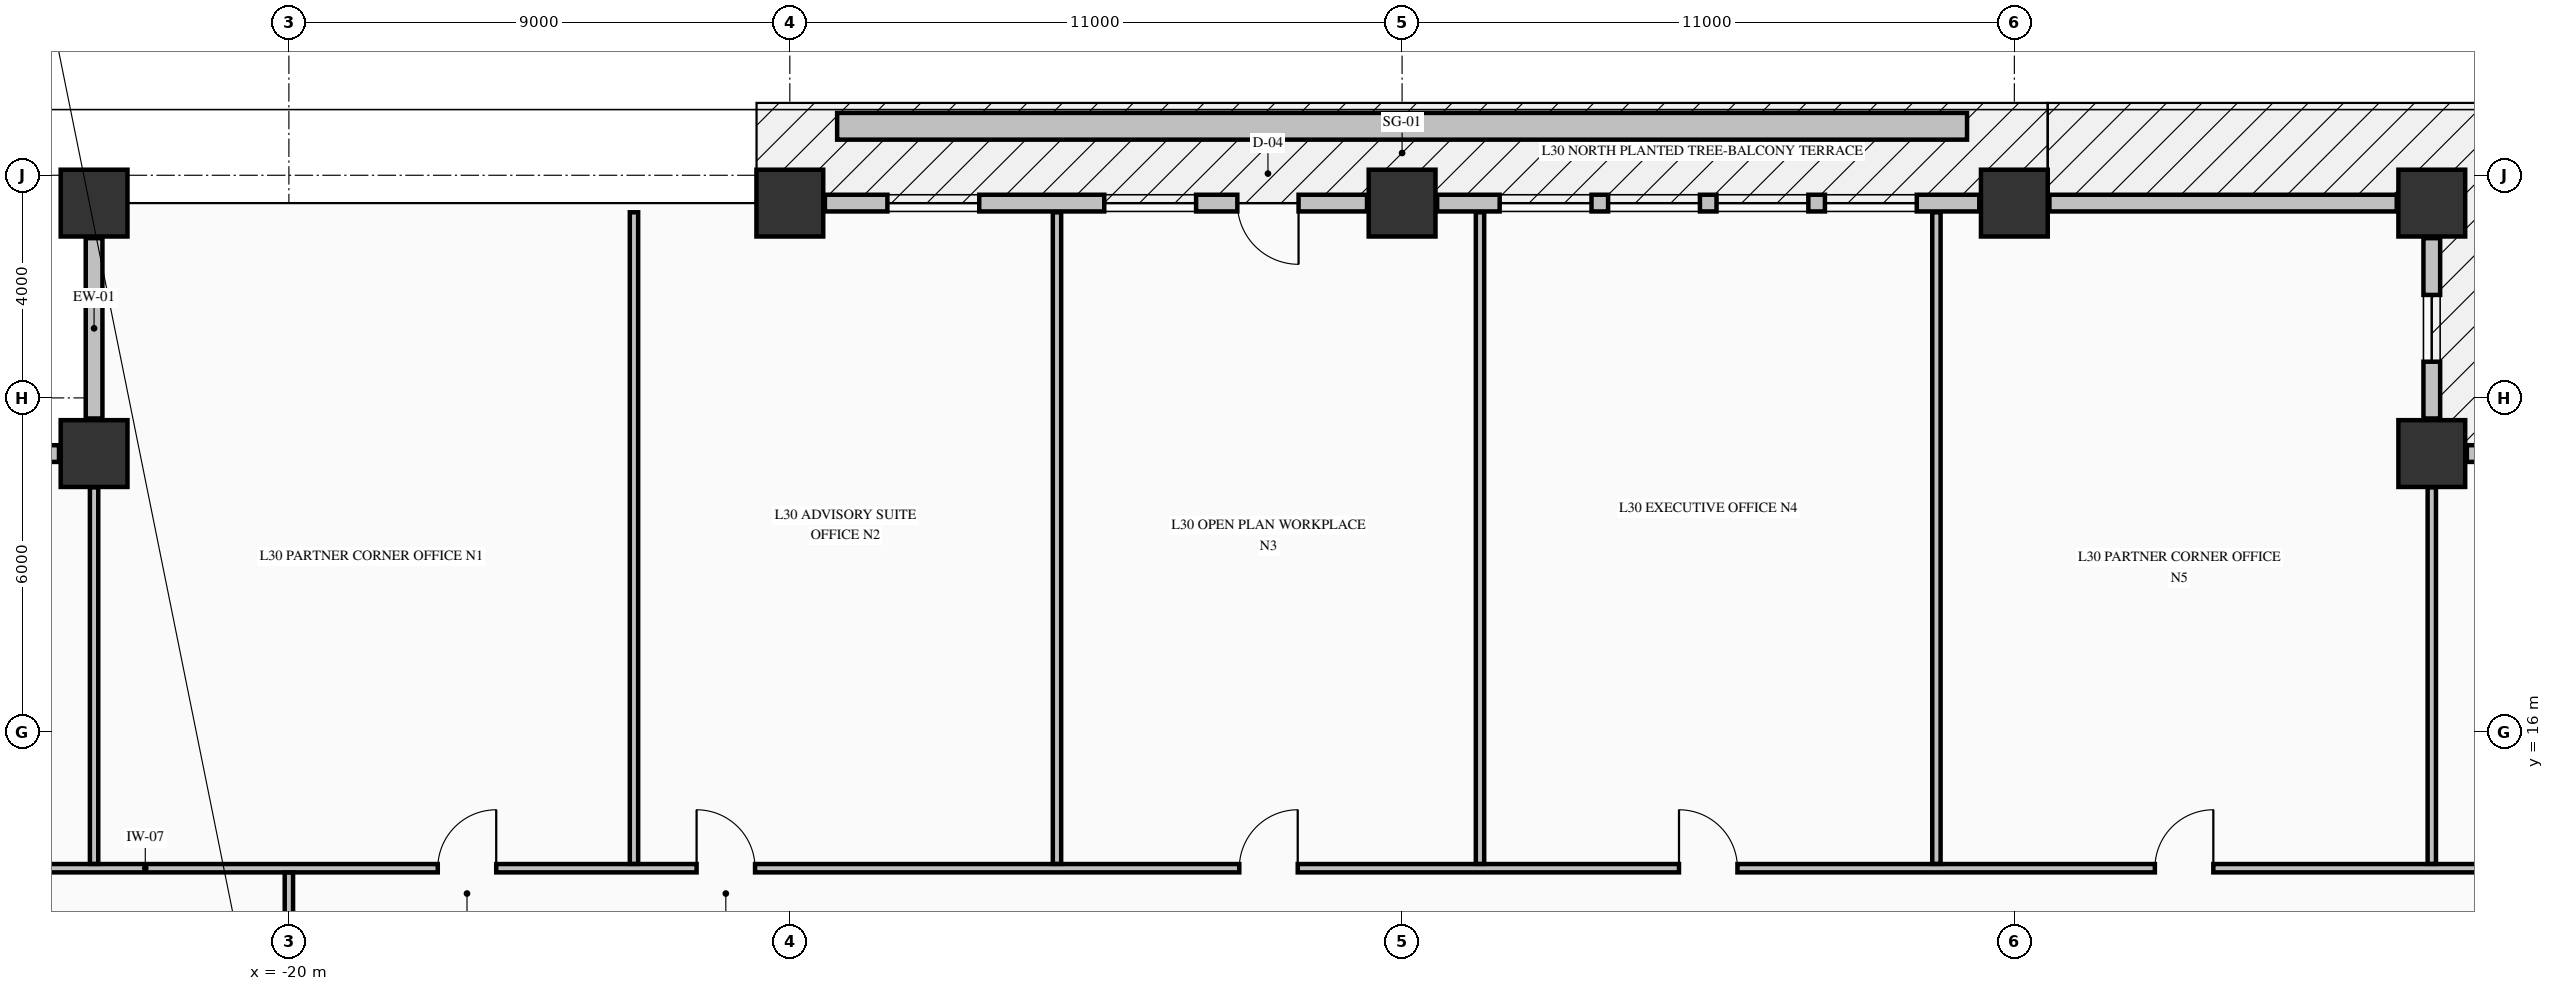
"""IFC4 building model, lengths in metres.
Left out: names, types, materials, properties, quantities, classifications, styles, units other than length and angle.
Written with IfcOpenShell. Run it as: python <this file> out.ifc"""

import sys

from ifc_helpers import new_model, si_unit, direction, frame, frame_2d, origin, origin_2d, place, context, subcontext, project, spatial, rectangle, extrude, element, fill, save


model = new_model("IFC4")
c1 = context("Model", 3, precision=1e-05, world=origin(), true_north=direction((0.0, 1.0)))
c2 = subcontext(c1, "Body", "Model", "MODEL_VIEW")
j1 = project(units=[si_unit("LENGTHUNIT", "METRE"), si_unit("PLANEANGLEUNIT", "RADIAN")], contexts=[c1])
p1 = place(None, origin())
s1 = spatial("IfcSite", under=j1, at=p1, CompositionType="ELEMENT")
p2 = place(p1, origin())
s2 = spatial("IfcBuilding", under=s1, at=p2, CompositionType="ELEMENT")
p3 = place(p2, frame((0.0, 0.0, 121.35)))
s3 = spatial("IfcBuildingStorey", under=s2, at=p3, CompositionType="ELEMENT", Elevation=121.35)
for number, where, z_axis, x_axis in (
    (1, (-23.5, 25.5, -0.425), (0.0, 0.0, 1.0), (1.0, 0.0, 0.0)),
    (2, (-11.0, 25.5, -0.425), (0.0, 0.0, 1.0), (1.0, 0.0, 0.0)),
    (3, (0.0, 25.5, -0.425), (0.0, 0.0, 1.0), (1.0, 0.0, 0.0)),
    (4, (11.0, 25.5, -0.425), (0.0, 0.0, 1.0), (1.0, 0.0, 0.0)),
    (5, (18.5, 25.5, -0.425), (0.0, 0.0, 1.0), (1.0, 0.0, 0.0)),
    (6, (18.5, 21.0, -0.425), (0.0, 0.0, 1.0), (1.0, 0.0, 0.0)),
    (7, (-23.5, 21.0, -0.425), (0.0, 0.0, 1.0), (1.0, 0.0, 0.0)),
):
    element("IfcColumn", number, at=place(p3, frame(where, z_axis=z_axis, x_axis=x_axis)), inside=s3, PredefinedType="COLUMN", context=c2, shape_type="SweptSolid", body=[
        extrude(rectangle(XDim=1.2, YDim=1.2, at=origin_2d()), origin(), (0.0, 0.0, 1.0), 3.745),
    ])
p4 = place(p3, frame((22.37, 21.0, 0.0), z_axis=(0.0, 0.0, 1.0), x_axis=(-1.0, 0.0, 0.0)))
e8 = element("IfcWall", 8, at=p4, inside=s3, PredefinedType="STANDARD", context=c2, shape_type="SweptSolid", body=[
    extrude(rectangle(XDim=3.24, YDim=0.3, at=frame_2d((1.62, 0.0))), origin(), (0.0, 0.0, 1.0), 2.712),
])
p5 = place(p4, frame((1.02, 0.0, 0.82)))
e9 = element("IfcOpeningElement", 9, at=p5, cuts=e8, PredefinedType="OPENING", context=c2, shape_type="SweptSolid", body=[
    extrude(rectangle(XDim=1.2, YDim=1.65, at=frame_2d((0.6, 0.825))), frame((0.0, 0.16, 0.0), z_axis=(0.0, -1.0, 0.0), x_axis=(1.0, 0.0, 0.0)), (0.0, 0.0, 1.0), 0.32),
])
p6 = place(p3, frame((18.5, 21.63, 0.0), z_axis=(0.0, 0.0, 1.0), x_axis=(0.0, 1.0, 0.0)))
e10 = element("IfcWall", 10, at=p6, inside=s3, PredefinedType="STANDARD", context=c2, shape_type="SweptSolid", body=[
    extrude(rectangle(XDim=3.24, YDim=0.3, at=frame_2d((1.62, 0.0))), origin(), (0.0, 0.0, 1.0), 2.712),
])
p7 = place(p6, frame((1.02, 0.0, 0.82)))
e11 = element("IfcOpeningElement", 11, at=p7, cuts=e10, PredefinedType="OPENING", context=c2, shape_type="SweptSolid", body=[
    extrude(rectangle(XDim=1.2, YDim=1.65, at=frame_2d((0.6, 0.825))), frame((0.0, 0.16, 0.0), z_axis=(0.0, -1.0, 0.0), x_axis=(1.0, 0.0, 0.0)), (0.0, 0.0, 1.0), 0.32),
])
for number, where, z_axis, x_axis in (
    (12, (-23.5, 24.87, 0.0), (0.0, 0.0, 1.0), (0.0, -1.0, 0.0)),
    (13, (-24.13, 21.0, 0.0), (0.0, 0.0, 1.0), (-1.0, 0.0, 0.0)),
):
    element("IfcWall", number, at=place(p3, frame(where, z_axis=z_axis, x_axis=x_axis)), inside=s3, PredefinedType="STANDARD", context=c2, shape_type="SweptSolid", body=[
        extrude(rectangle(XDim=3.24, YDim=0.3, at=frame_2d((1.62, 0.0))), origin(), (0.0, 0.0, 1.0), 1.512),
    ])
p8 = place(p3, frame((-0.63, 25.5, 0.0), z_axis=(0.0, 0.0, 1.0), x_axis=(-1.0, 0.0, 0.0)))
e14 = element("IfcWall", 14, at=p8, inside=s3, PredefinedType="STANDARD", context=c2, shape_type="SweptSolid", body=[
    extrude(rectangle(XDim=9.74, YDim=0.3, at=frame_2d((4.87, 0.0))), origin(), (0.0, 0.0, 1.0), 2.712),
])
p9 = place(p8, frame((1.23, 0.0, 0.0)))
e15 = element("IfcOpeningElement", 15, at=p9, cuts=e14, PredefinedType="OPENING", context=c2, shape_type="SweptSolid", body=[
    extrude(rectangle(XDim=1.1, YDim=2.15, at=frame_2d((0.55, 1.075))), frame((0.0, 0.16, 0.0), z_axis=(0.0, -1.0, 0.0), x_axis=(1.0, 0.0, 0.0)), (0.0, 0.0, 1.0), 0.32),
])
p10 = place(p8, frame((3.071, 0.0, 0.8)))
e16 = element("IfcOpeningElement", 16, at=p10, cuts=e14, PredefinedType="OPENING", context=c2, shape_type="SweptSolid", body=[
    extrude(rectangle(XDim=1.65, YDim=1.7, at=frame_2d((0.825, 0.85))), frame((0.0, 0.16, 0.0), z_axis=(0.0, -1.0, 0.0), x_axis=(1.0, 0.0, 0.0)), (0.0, 0.0, 1.0), 0.32),
])
p11 = place(p8, frame((6.967, 0.0, 0.8)))
e17 = element("IfcOpeningElement", 17, at=p11, cuts=e14, PredefinedType="OPENING", context=c2, shape_type="SweptSolid", body=[
    extrude(rectangle(XDim=1.65, YDim=1.7, at=frame_2d((0.825, 0.85))), frame((0.0, 0.16, 0.0), z_axis=(0.0, -1.0, 0.0), x_axis=(1.0, 0.0, 0.0)), (0.0, 0.0, 1.0), 0.32),
])
p12 = place(p3, frame((10.37, 25.5, 0.0), z_axis=(0.0, 0.0, 1.0), x_axis=(-1.0, 0.0, 0.0)))
e18 = element("IfcWall", 18, at=p12, inside=s3, PredefinedType="STANDARD", context=c2, shape_type="SweptSolid", body=[
    extrude(rectangle(XDim=9.74, YDim=0.3, at=frame_2d((4.87, 0.0))), origin(), (0.0, 0.0, 1.0), 2.712),
])
p13 = place(p12, frame((1.123, 0.0, 0.8)))
e19 = element("IfcOpeningElement", 19, at=p13, cuts=e18, PredefinedType="OPENING", context=c2, shape_type="SweptSolid", body=[
    extrude(rectangle(XDim=1.65, YDim=1.7, at=frame_2d((0.825, 0.85))), frame((0.0, 0.16, 0.0), z_axis=(0.0, -1.0, 0.0), x_axis=(1.0, 0.0, 0.0)), (0.0, 0.0, 1.0), 0.32),
])
p14 = place(p12, frame((3.071, 0.0, 0.8)))
e20 = element("IfcOpeningElement", 20, at=p14, cuts=e18, PredefinedType="OPENING", context=c2, shape_type="SweptSolid", body=[
    extrude(rectangle(XDim=1.65, YDim=1.7, at=frame_2d((0.825, 0.85))), frame((0.0, 0.16, 0.0), z_axis=(0.0, -1.0, 0.0), x_axis=(1.0, 0.0, 0.0)), (0.0, 0.0, 1.0), 0.32),
])
p15 = place(p12, frame((5.019, 0.0, 0.8)))
e21 = element("IfcOpeningElement", 21, at=p15, cuts=e18, PredefinedType="OPENING", context=c2, shape_type="SweptSolid", body=[
    extrude(rectangle(XDim=1.65, YDim=1.7, at=frame_2d((0.825, 0.85))), frame((0.0, 0.16, 0.0), z_axis=(0.0, -1.0, 0.0), x_axis=(1.0, 0.0, 0.0)), (0.0, 0.0, 1.0), 0.32),
])
p16 = place(p12, frame((6.967, 0.0, 0.8)))
e22 = element("IfcOpeningElement", 22, at=p16, cuts=e18, PredefinedType="OPENING", context=c2, shape_type="SweptSolid", body=[
    extrude(rectangle(XDim=1.65, YDim=1.7, at=frame_2d((0.825, 0.85))), frame((0.0, 0.16, 0.0), z_axis=(0.0, -1.0, 0.0), x_axis=(1.0, 0.0, 0.0)), (0.0, 0.0, 1.0), 0.32),
])
p17 = place(p3, frame((17.87, 25.5, 0.0), z_axis=(0.0, 0.0, 1.0), x_axis=(-1.0, 0.0, 0.0)))
e23 = element("IfcWall", 23, at=p17, inside=s3, PredefinedType="STANDARD", context=c2, shape_type="SweptSolid", body=[
    extrude(rectangle(XDim=6.24, YDim=0.3, at=frame_2d((3.12, 0.0))), origin(), (0.0, 0.0, 1.0), 2.712),
])
p18 = place(p3, frame((-27.835, 13.55, 0.0), z_axis=(0.0, 0.0, 1.0), x_axis=(1.0, 0.0, 0.0)))
e24 = element("IfcWall", 24, at=p18, inside=s3, PredefinedType="PARTITIONING", context=c2, shape_type="SweptSolid", body=[
    extrude(rectangle(XDim=50.67, YDim=0.15, at=frame_2d((25.335, 0.0))), origin(), (0.0, 0.0, 1.0), 3.32),
])
p19 = place(p18, frame((10.51, 0.0, 0.0)))
e25 = element("IfcOpeningElement", 25, at=p19, cuts=e24, PredefinedType="OPENING", context=c2, shape_type="SweptSolid", body=[
    extrude(rectangle(XDim=1.05, YDim=2.15, at=frame_2d((0.525, 1.075))), frame((0.0, 0.085, 0.0), z_axis=(0.0, -1.0, 0.0), x_axis=(1.0, 0.0, 0.0)), (0.0, 0.0, 1.0), 0.17),
])
p20 = place(p18, frame((15.16, 0.0, 0.0)))
e26 = element("IfcOpeningElement", 26, at=p20, cuts=e24, PredefinedType="OPENING", context=c2, shape_type="SweptSolid", body=[
    extrude(rectangle(XDim=1.05, YDim=2.15, at=frame_2d((0.525, 1.075))), frame((0.0, 0.085, 0.0), z_axis=(0.0, -1.0, 0.0), x_axis=(1.0, 0.0, 0.0)), (0.0, 0.0, 1.0), 0.17),
])
p21 = place(p18, frame((24.91, 0.0, 0.0)))
e27 = element("IfcOpeningElement", 27, at=p21, cuts=e24, PredefinedType="OPENING", context=c2, shape_type="SweptSolid", body=[
    extrude(rectangle(XDim=1.05, YDim=2.15, at=frame_2d((0.525, 1.075))), frame((0.0, 0.085, 0.0), z_axis=(0.0, -1.0, 0.0), x_axis=(1.0, 0.0, 0.0)), (0.0, 0.0, 1.0), 0.17),
])
p22 = place(p18, frame((32.81, 0.0, 0.0)))
e28 = element("IfcOpeningElement", 28, at=p22, cuts=e24, PredefinedType="OPENING", context=c2, shape_type="SweptSolid", body=[
    extrude(rectangle(XDim=1.05, YDim=2.15, at=frame_2d((0.525, 1.075))), frame((0.0, 0.085, 0.0), z_axis=(0.0, -1.0, 0.0), x_axis=(1.0, 0.0, 0.0)), (0.0, 0.0, 1.0), 0.17),
])
p23 = place(p18, frame((41.36, 0.0, 0.0)))
e29 = element("IfcOpeningElement", 29, at=p23, cuts=e24, PredefinedType="OPENING", context=c2, shape_type="SweptSolid", body=[
    extrude(rectangle(XDim=1.05, YDim=2.15, at=frame_2d((0.525, 1.075))), frame((0.0, 0.085, 0.0), z_axis=(0.0, -1.0, 0.0), x_axis=(1.0, 0.0, 0.0)), (0.0, 0.0, 1.0), 0.17),
])
p24 = place(p3, frame((-23.5, 13.628, 0.0), z_axis=(0.0, 0.0, 1.0), x_axis=(0.0, 1.0, 0.0)))
e30 = element("IfcWall", 30, at=p24, inside=s3, PredefinedType="PARTITIONING", context=c2, shape_type="SweptSolid", body=[
    extrude(rectangle(XDim=6.766, YDim=0.15, at=frame_2d((3.383, 0.0))), origin(), (0.0, 0.0, 1.0), 3.32),
])
p25 = place(p3, frame((-20.0, 11.006, 0.0), z_axis=(0.0, 0.0, 1.0), x_axis=(0.0, 1.0, 0.0)))
e31 = element("IfcWall", 31, at=p25, inside=s3, PredefinedType="PARTITIONING", context=c2, shape_type="SweptSolid", body=[
    extrude(rectangle(XDim=2.466, YDim=0.15, at=frame_2d((1.233, 0.0))), origin(), (0.0, 0.0, 1.0), 2.81),
])
p26 = place(p25, frame((0.549, 0.0, 0.0)))
e32 = element("IfcOpeningElement", 32, at=p26, cuts=e31, PredefinedType="OPENING", context=c2, shape_type="SweptSolid", body=[
    extrude(rectangle(XDim=0.95, YDim=2.15, at=frame_2d((0.475, 1.075))), frame((0.0, 0.085, 0.0), z_axis=(0.0, -1.0, 0.0), x_axis=(1.0, 0.0, 0.0)), (0.0, 0.0, 1.0), 0.17),
])
for number, where, z_axis, x_axis in (
    (33, (-13.8, 13.628, 0.0), (0.0, 0.0, 1.0), (0.0, 1.0, 0.0)),
    (34, (-6.2, 13.628, 0.0), (0.0, 0.0, 1.0), (0.0, 1.0, 0.0)),
    (35, (1.4, 13.628, 0.0), (0.0, 0.0, 1.0), (0.0, 1.0, 0.0)),
    (36, (9.6, 13.628, 0.0), (0.0, 0.0, 1.0), (0.0, 1.0, 0.0)),
):
    element("IfcWall", number, at=place(p3, frame(where, z_axis=z_axis, x_axis=x_axis)), inside=s3, PredefinedType="PARTITIONING", context=c2, shape_type="SweptSolid", body=[
        extrude(rectangle(XDim=11.707, YDim=0.15, at=frame_2d((5.854, 0.0))), origin(), (0.0, 0.0, 1.0), 3.32),
    ])
p27 = place(p3, frame((18.5, 13.628, 0.0), z_axis=(0.0, 0.0, 1.0), x_axis=(0.0, 1.0, 0.0)))
e37 = element("IfcWall", 37, at=p27, inside=s3, PredefinedType="PARTITIONING", context=c2, shape_type="SweptSolid", body=[
    extrude(rectangle(XDim=6.766, YDim=0.15, at=frame_2d((3.383, 0.0))), origin(), (0.0, 0.0, 1.0), 3.32),
])
p28 = place(p3, frame((-10.15, 26.88, -0.04), z_axis=(0.0, 0.0, 1.0), x_axis=(1.0, 0.0, 0.0)))
e38 = element("IfcWall", 38, at=p28, inside=s3, PredefinedType="PARAPET", context=c2, shape_type="SweptSolid", body=[
    extrude(rectangle(XDim=20.3, YDim=0.48, at=frame_2d((10.15, 0.0))), origin(), (0.0, 0.0, 1.0), 0.52),
])
p29 = place(p7, origin())
e39 = element("IfcWindow", 39, at=p29, inside=s3, PartitioningType="SINGLE_PANEL", PredefinedType="WINDOW", context=c2, shape_type="SweptSolid", body=[
    extrude(rectangle(XDim=1.2, YDim=1.65, at=frame_2d((0.6, 0.825))), frame((0.0, 0.03, 0.0), z_axis=(0.0, -1.0, 0.0), x_axis=(1.0, 0.0, 0.0)), (0.0, 0.0, 1.0), 0.06),
])
fill(e11, e39)
p30 = place(p9, origin())
e40 = element("IfcDoor", 40, at=p30, inside=s3, OperationType="SINGLE_SWING_LEFT", PredefinedType="DOOR", context=c2, shape_type="SweptSolid", body=[
    extrude(rectangle(XDim=1.1, YDim=2.15, at=frame_2d((0.55, 1.075))), frame((0.0, 0.025, 0.0), z_axis=(0.0, -1.0, 0.0), x_axis=(1.0, 0.0, 0.0)), (0.0, 0.0, 1.0), 0.05),
])
fill(e15, e40)
p31 = place(p10, origin())
e41 = element("IfcWindow", 41, at=p31, inside=s3, PartitioningType="SINGLE_PANEL", PredefinedType="WINDOW", context=c2, shape_type="SweptSolid", body=[
    extrude(rectangle(XDim=1.65, YDim=1.7, at=frame_2d((0.825, 0.85))), frame((0.0, 0.03, 0.0), z_axis=(0.0, -1.0, 0.0), x_axis=(1.0, 0.0, 0.0)), (0.0, 0.0, 1.0), 0.06),
])
fill(e16, e41)
p32 = place(p11, origin())
e42 = element("IfcWindow", 42, at=p32, inside=s3, PartitioningType="SINGLE_PANEL", PredefinedType="WINDOW", context=c2, shape_type="SweptSolid", body=[
    extrude(rectangle(XDim=1.65, YDim=1.7, at=frame_2d((0.825, 0.85))), frame((0.0, 0.03, 0.0), z_axis=(0.0, -1.0, 0.0), x_axis=(1.0, 0.0, 0.0)), (0.0, 0.0, 1.0), 0.06),
])
fill(e17, e42)
p33 = place(p13, origin())
e43 = element("IfcWindow", 43, at=p33, inside=s3, PartitioningType="SINGLE_PANEL", PredefinedType="WINDOW", context=c2, shape_type="SweptSolid", body=[
    extrude(rectangle(XDim=1.65, YDim=1.7, at=frame_2d((0.825, 0.85))), frame((0.0, 0.03, 0.0), z_axis=(0.0, -1.0, 0.0), x_axis=(1.0, 0.0, 0.0)), (0.0, 0.0, 1.0), 0.06),
])
fill(e19, e43)
p34 = place(p14, origin())
e44 = element("IfcWindow", 44, at=p34, inside=s3, PartitioningType="SINGLE_PANEL", PredefinedType="WINDOW", context=c2, shape_type="SweptSolid", body=[
    extrude(rectangle(XDim=1.65, YDim=1.7, at=frame_2d((0.825, 0.85))), frame((0.0, 0.03, 0.0), z_axis=(0.0, -1.0, 0.0), x_axis=(1.0, 0.0, 0.0)), (0.0, 0.0, 1.0), 0.06),
])
fill(e20, e44)
p35 = place(p15, origin())
e45 = element("IfcWindow", 45, at=p35, inside=s3, PartitioningType="SINGLE_PANEL", PredefinedType="WINDOW", context=c2, shape_type="SweptSolid", body=[
    extrude(rectangle(XDim=1.65, YDim=1.7, at=frame_2d((0.825, 0.85))), frame((0.0, 0.03, 0.0), z_axis=(0.0, -1.0, 0.0), x_axis=(1.0, 0.0, 0.0)), (0.0, 0.0, 1.0), 0.06),
])
fill(e21, e45)
p36 = place(p16, origin())
e46 = element("IfcWindow", 46, at=p36, inside=s3, PartitioningType="SINGLE_PANEL", PredefinedType="WINDOW", context=c2, shape_type="SweptSolid", body=[
    extrude(rectangle(XDim=1.65, YDim=1.7, at=frame_2d((0.825, 0.85))), frame((0.0, 0.03, 0.0), z_axis=(0.0, -1.0, 0.0), x_axis=(1.0, 0.0, 0.0)), (0.0, 0.0, 1.0), 0.06),
])
fill(e22, e46)
p37 = place(p19, origin())
e47 = element("IfcDoor", 47, at=p37, inside=s3, OperationType="SINGLE_SWING_RIGHT", PredefinedType="DOOR", context=c2, shape_type="SweptSolid", body=[
    extrude(rectangle(XDim=1.05, YDim=2.15, at=frame_2d((0.525, 1.075))), frame((0.0, 0.025, 0.0), z_axis=(0.0, -1.0, 0.0), x_axis=(1.0, 0.0, 0.0)), (0.0, 0.0, 1.0), 0.05),
])
fill(e25, e47)
p38 = place(p20, origin())
e48 = element("IfcDoor", 48, at=p38, inside=s3, OperationType="SINGLE_SWING_LEFT", PredefinedType="DOOR", context=c2, shape_type="SweptSolid", body=[
    extrude(rectangle(XDim=1.05, YDim=2.15, at=frame_2d((0.525, 1.075))), frame((0.0, 0.025, 0.0), z_axis=(0.0, -1.0, 0.0), x_axis=(1.0, 0.0, 0.0)), (0.0, 0.0, 1.0), 0.05),
])
fill(e26, e48)
p39 = place(p21, origin())
e49 = element("IfcDoor", 49, at=p39, inside=s3, OperationType="SINGLE_SWING_RIGHT", PredefinedType="DOOR", context=c2, shape_type="SweptSolid", body=[
    extrude(rectangle(XDim=1.05, YDim=2.15, at=frame_2d((0.525, 1.075))), frame((0.0, 0.025, 0.0), z_axis=(0.0, -1.0, 0.0), x_axis=(1.0, 0.0, 0.0)), (0.0, 0.0, 1.0), 0.05),
])
fill(e27, e49)
p40 = place(p22, origin())
e50 = element("IfcDoor", 50, at=p40, inside=s3, OperationType="SINGLE_SWING_LEFT", PredefinedType="DOOR", context=c2, shape_type="SweptSolid", body=[
    extrude(rectangle(XDim=1.05, YDim=2.15, at=frame_2d((0.525, 1.075))), frame((0.0, 0.025, 0.0), z_axis=(0.0, -1.0, 0.0), x_axis=(1.0, 0.0, 0.0)), (0.0, 0.0, 1.0), 0.05),
])
fill(e28, e50)
p41 = place(p23, origin())
e51 = element("IfcDoor", 51, at=p41, inside=s3, OperationType="SINGLE_SWING_RIGHT", PredefinedType="DOOR", context=c2, shape_type="SweptSolid", body=[
    extrude(rectangle(XDim=1.05, YDim=2.15, at=frame_2d((0.525, 1.075))), frame((0.0, 0.025, 0.0), z_axis=(0.0, -1.0, 0.0), x_axis=(1.0, 0.0, 0.0)), (0.0, 0.0, 1.0), 0.05),
])
fill(e29, e51)
save(model, sys.argv[1])
